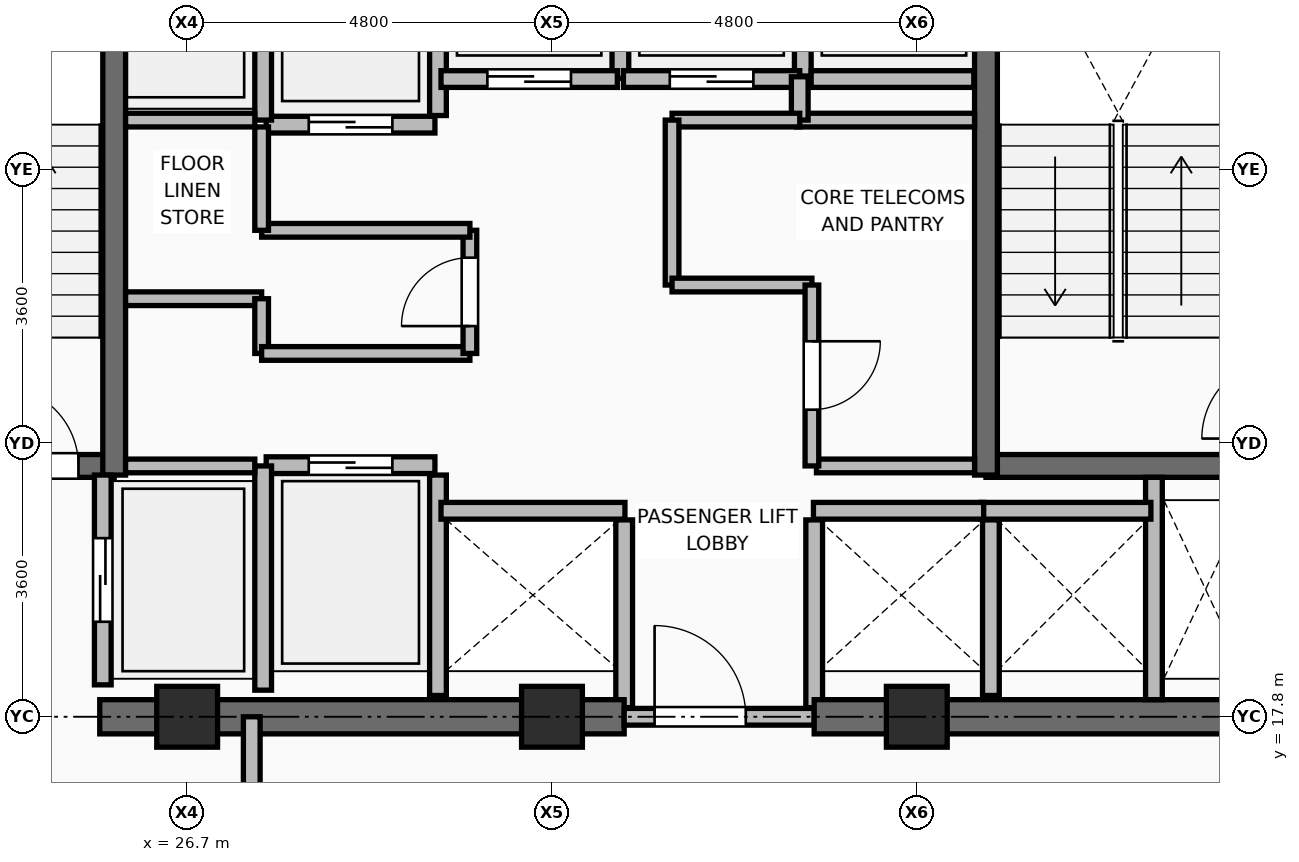
"""IFC4 building model, lengths in metres.
Left out: names, types, materials, properties, quantities, classifications, styles, units other than length and angle.
Written with IfcOpenShell. Run it as: python <this file> out.ifc"""

import sys

from ifc_helpers import new_model, si_unit, direction, frame, frame_2d, origin, origin_2d, place, context, subcontext, project, spatial, rectangle, extrude, element, fill, save


model = new_model("IFC4")
c1 = context("Model", 3, precision=1e-05, world=origin(), true_north=direction((0.0, 1.0)))
c2 = subcontext(c1, "Body", "Model", "MODEL_VIEW")
j1 = project(units=[si_unit("LENGTHUNIT", "METRE"), si_unit("PLANEANGLEUNIT", "RADIAN")], contexts=[c1])
p1 = place(None, origin())
s1 = spatial("IfcSite", under=j1, at=p1, CompositionType="ELEMENT")
p2 = place(p1, origin())
s2 = spatial("IfcBuilding", under=s1, at=p2, CompositionType="ELEMENT")
p3 = place(p2, frame((0.0, 0.0, 246.15)))
s3 = spatial("IfcBuildingStorey", under=s2, at=p3, CompositionType="ELEMENT", Elevation=246.15)
for number, where, z_axis, x_axis in (
    (1, (26.7, 17.8, 0.0), (0.0, 0.0, 1.0), (1.0, 0.0, 0.0)),
    (2, (31.5, 17.8, 0.0), (0.0, 0.0, 1.0), (1.0, 0.0, 0.0)),
    (3, (36.3, 17.8, 0.0), (0.0, 0.0, 1.0), (1.0, 0.0, 0.0)),
):
    element("IfcColumn", number, at=place(p3, frame(where, z_axis=z_axis, x_axis=x_axis)), inside=s3, PredefinedType="COLUMN", context=c2, shape_type="SweptSolid", body=[
        extrude(rectangle(XDim=0.8, YDim=0.8, at=origin_2d()), origin(), (0.0, 0.0, 1.0), 3.75),
    ])
p4 = place(p3, frame((30.0, 18.08, 0.0), z_axis=(0.0, 0.0, 1.0), x_axis=(0.0, 1.0, 0.0)))
e4 = element("IfcWall", 4, at=p4, inside=s3, PredefinedType="PARTITIONING", context=c2, shape_type="SweptSolid", body=[
    extrude(rectangle(XDim=2.9, YDim=0.22, at=frame_2d((1.45, 0.0))), origin(), (0.0, 0.0, 1.0), 3.545),
])
for number, where, z_axis, x_axis in (
    (5, (32.45, 17.92, 0.0), (0.0, 0.0, 1.0), (0.0, 1.0, 0.0)),
    (6, (34.95, 17.92, 0.0), (0.0, 0.0, 1.0), (0.0, 1.0, 0.0)),
):
    element("IfcWall", number, at=place(p3, frame(where, z_axis=z_axis, x_axis=x_axis)), inside=s3, PredefinedType="PARTITIONING", context=c2, shape_type="SweptSolid", body=[
        extrude(rectangle(XDim=2.47, YDim=0.22, at=frame_2d((1.235, 0.0))), origin(), (0.0, 0.0, 1.0), 3.545),
    ])
p5 = place(p3, frame((37.275, 18.08, 0.0), z_axis=(0.0, 0.0, 1.0), x_axis=(0.0, 1.0, 0.0)))
e7 = element("IfcWall", 7, at=p5, inside=s3, PredefinedType="PARTITIONING", context=c2, shape_type="SweptSolid", body=[
    extrude(rectangle(XDim=2.31, YDim=0.22, at=frame_2d((1.155, 0.0))), origin(), (0.0, 0.0, 1.0), 3.545),
])
p6 = place(p3, frame((30.0, 25.71, 0.0), z_axis=(0.0, 0.0, 1.0), x_axis=(0.0, 1.0, 0.0)))
e8 = element("IfcWall", 8, at=p6, inside=s3, PredefinedType="PARTITIONING", context=c2, shape_type="SweptSolid", body=[
    extrude(rectangle(XDim=2.73, YDim=0.22, at=frame_2d((1.365, 0.0))), origin(), (0.0, 0.0, 1.0), 3.545),
])
p7 = place(p3, frame((32.4, 26.2, 0.0), z_axis=(0.0, 0.0, 1.0), x_axis=(0.0, 1.0, 0.0)))
e9 = element("IfcWall", 9, at=p7, inside=s3, PredefinedType="PARTITIONING", context=c2, shape_type="SweptSolid", body=[
    extrude(rectangle(XDim=2.24, YDim=0.22, at=frame_2d((1.12, 0.0))), origin(), (0.0, 0.0, 1.0), 3.545),
])
p8 = place(p3, frame((34.8, 26.23, 0.0), z_axis=(0.0, 0.0, 1.0), x_axis=(0.0, 1.0, 0.0)))
e10 = element("IfcWall", 10, at=p8, inside=s3, PredefinedType="PARTITIONING", context=c2, shape_type="SweptSolid", body=[
    extrude(rectangle(XDim=2.21, YDim=0.22, at=frame_2d((1.105, 0.0))), origin(), (0.0, 0.0, 1.0), 3.545),
])
p9 = place(p3, frame((34.91, 26.19, 0.0), z_axis=(0.0, 0.0, 1.0), x_axis=(1.0, 0.0, 0.0)))
e11 = element("IfcWall", 11, at=p9, inside=s3, PredefinedType="PARTITIONING", context=c2, shape_type="SweptSolid", body=[
    extrude(rectangle(XDim=2.14, YDim=0.22, at=frame_2d((1.07, 0.0))), origin(), (0.0, 0.0, 1.0), 3.545),
])
p10 = place(p3, frame((25.55, 17.8, 0.0), z_axis=(0.0, 0.0, 1.0), x_axis=(1.0, 0.0, 0.0)))
e12 = element("IfcWall", 12, at=p10, inside=s3, PredefinedType="SHEAR", context=c2, shape_type="SweptSolid", body=[
    extrude(rectangle(XDim=6.9, YDim=0.45, at=frame_2d((3.45, 0.0))), origin(), (0.0, 0.0, 1.0), 3.57),
])
p11 = place(p3, frame((32.45, 17.8, 0.0), z_axis=(0.0, 0.0, 1.0), x_axis=(1.0, 0.0, 0.0)))
e13 = element("IfcWall", 13, at=p11, inside=s3, PredefinedType="PARTITIONING", context=c2, shape_type="SweptSolid", body=[
    extrude(rectangle(XDim=2.5, YDim=0.22, at=frame_2d((1.25, 0.0))), origin(), (0.0, 0.0, 1.0), 3.081),
])
p12 = place(p11, frame((0.4, 0.0, 0.0)))
e14 = element("IfcOpeningElement", 14, at=p12, cuts=e13, PredefinedType="OPENING", context=c2, shape_type="SweptSolid", body=[
    extrude(rectangle(XDim=1.2, YDim=2.1, at=frame_2d((0.6, 1.05))), frame((0.0, 0.12, 0.0), z_axis=(0.0, -1.0, 0.0), x_axis=(1.0, 0.0, 0.0)), (0.0, 0.0, 1.0), 0.24),
])
p13 = place(p3, frame((34.95, 17.8, 0.0), z_axis=(0.0, 0.0, 1.0), x_axis=(1.0, 0.0, 0.0)))
e15 = element("IfcWall", 15, at=p13, inside=s3, PredefinedType="SHEAR", context=c2, shape_type="SweptSolid", body=[
    extrude(rectangle(XDim=6.375, YDim=0.45, at=frame_2d((3.188, 0.0))), origin(), (0.0, 0.0, 1.0), 3.57),
])
p14 = place(p3, frame((22.125, 21.1, 0.0), z_axis=(0.0, 0.0, 1.0), x_axis=(1.0, 0.0, 0.0)))
e16 = element("IfcWall", 16, at=p14, inside=s3, PredefinedType="SHEAR", context=c2, shape_type="SweptSolid", body=[
    extrude(rectangle(XDim=3.615, YDim=0.3, at=frame_2d((1.808, 0.0))), origin(), (0.0, 0.0, 1.0), 3.57),
])
p15 = place(p14, frame((2.095, 0.0, 0.0)))
e17 = element("IfcOpeningElement", 17, at=p15, cuts=e16, PredefinedType="OPENING", context=c2, shape_type="SweptSolid", body=[
    extrude(rectangle(XDim=1.05, YDim=2.1, at=frame_2d((0.525, 1.05))), frame((0.0, 0.16, 0.0), z_axis=(0.0, -1.0, 0.0), x_axis=(1.0, 0.0, 0.0)), (0.0, 0.0, 1.0), 0.32),
])
p16 = place(p3, frame((25.74, 20.98, 0.0), z_axis=(0.0, 0.0, 1.0), x_axis=(0.0, 1.0, 0.0)))
e18 = element("IfcWall", 18, at=p16, inside=s3, PredefinedType="SHEAR", context=c2, shape_type="SweptSolid", body=[
    extrude(rectangle(XDim=7.99, YDim=0.3, at=frame_2d((3.995, 0.0))), origin(), (0.0, 0.0, 1.0), 3.57),
])
p17 = place(p3, frame((37.21, 21.1, 0.0), z_axis=(0.0, 0.0, 1.0), x_axis=(1.0, 0.0, 0.0)))
e19 = element("IfcWall", 19, at=p17, inside=s3, PredefinedType="SHEAR", context=c2, shape_type="SweptSolid", body=[
    extrude(rectangle(XDim=3.665, YDim=0.3, at=frame_2d((1.833, 0.0))), origin(), (0.0, 0.0, 1.0), 3.57),
])
p18 = place(p3, frame((37.21, 20.98, 0.0), z_axis=(0.0, 0.0, 1.0), x_axis=(0.0, 1.0, 0.0)))
e20 = element("IfcWall", 20, at=p18, inside=s3, PredefinedType="SHEAR", context=c2, shape_type="SweptSolid", body=[
    extrude(rectangle(XDim=7.99, YDim=0.3, at=frame_2d((3.995, 0.0))), origin(), (0.0, 0.0, 1.0), 3.57),
])
p19 = place(p3, frame((39.42, 18.025, 0.0), z_axis=(0.0, 0.0, 1.0), x_axis=(0.0, 1.0, 0.0)))
e21 = element("IfcWall", 21, at=p19, inside=s3, PredefinedType="PARTITIONING", context=c2, shape_type="SweptSolid", body=[
    extrude(rectangle(XDim=2.925, YDim=0.22, at=frame_2d((1.462, 0.0))), origin(), (0.0, 0.0, 1.0), 3.55),
])
p20 = place(p3, frame((25.59, 18.22, 0.0), z_axis=(0.0, 0.0, 1.0), x_axis=(0.0, 1.0, 0.0)))
e22 = element("IfcWall", 22, at=p20, inside=s3, PredefinedType="PARTITIONING", context=c2, shape_type="SweptSolid", body=[
    extrude(rectangle(XDim=2.76, YDim=0.22, at=frame_2d((1.38, 0.0))), origin(), (0.0, 0.0, 1.0), 3.55),
])
p21 = place(p20, frame((0.83, 0.0, 0.0)))
e23 = element("IfcOpeningElement", 23, at=p21, cuts=e22, PredefinedType="OPENING", context=c2, shape_type="SweptSolid", body=[
    extrude(rectangle(XDim=1.1, YDim=2.2, at=frame_2d((0.55, 1.1))), frame((0.0, 0.12, 0.0), z_axis=(0.0, -1.0, 0.0), x_axis=(1.0, 0.0, 0.0)), (0.0, 0.0, 1.0), 0.24),
])
p22 = place(p3, frame((27.74, 21.11, 0.0), z_axis=(0.0, 0.0, 1.0), x_axis=(1.0, 0.0, 0.0)))
e24 = element("IfcWall", 24, at=p22, inside=s3, PredefinedType="PARTITIONING", context=c2, shape_type="SweptSolid", body=[
    extrude(rectangle(XDim=2.22, YDim=0.22, at=frame_2d((1.11, 0.0))), origin(), (0.0, 0.0, 1.0), 3.55),
])
p23 = place(p22, frame((0.56, 0.0, 0.0)))
e25 = element("IfcOpeningElement", 25, at=p23, cuts=e24, PredefinedType="OPENING", context=c2, shape_type="SweptSolid", body=[
    extrude(rectangle(XDim=1.1, YDim=2.2, at=frame_2d((0.55, 1.1))), frame((0.0, 0.12, 0.0), z_axis=(0.0, -1.0, 0.0), x_axis=(1.0, 0.0, 0.0)), (0.0, 0.0, 1.0), 0.24),
])
p24 = place(p3, frame((27.74, 25.59, 0.0), z_axis=(0.0, 0.0, 1.0), x_axis=(1.0, 0.0, 0.0)))
e26 = element("IfcWall", 26, at=p24, inside=s3, PredefinedType="PARTITIONING", context=c2, shape_type="SweptSolid", body=[
    extrude(rectangle(XDim=2.22, YDim=0.22, at=frame_2d((1.11, 0.0))), origin(), (0.0, 0.0, 1.0), 3.55),
])
p25 = place(p24, frame((0.56, 0.0, 0.0)))
e27 = element("IfcOpeningElement", 27, at=p25, cuts=e26, PredefinedType="OPENING", context=c2, shape_type="SweptSolid", body=[
    extrude(rectangle(XDim=1.1, YDim=2.2, at=frame_2d((0.55, 1.1))), frame((0.0, 0.12, 0.0), z_axis=(0.0, -1.0, 0.0), x_axis=(1.0, 0.0, 0.0)), (0.0, 0.0, 1.0), 0.24),
])
p26 = place(p3, frame((30.04, 20.51, 0.0), z_axis=(0.0, 0.0, 1.0), x_axis=(1.0, 0.0, 0.0)))
e28 = element("IfcWall", 28, at=p26, inside=s3, PredefinedType="PARTITIONING", context=c2, shape_type="SweptSolid", body=[
    extrude(rectangle(XDim=2.42, YDim=0.22, at=frame_2d((1.21, 0.0))), origin(), (0.0, 0.0, 1.0), 3.55),
])
for number, where, z_axis, x_axis in (
    (29, (37.14, 20.51, 0.0), (0.0, 0.0, 1.0), (1.0, 0.0, 0.0)),
    (30, (34.94, 20.51, 0.0), (0.0, 0.0, 1.0), (1.0, 0.0, 0.0)),
):
    element("IfcWall", number, at=place(p3, frame(where, z_axis=z_axis, x_axis=x_axis)), inside=s3, PredefinedType="PARTITIONING", context=c2, shape_type="SweptSolid", body=[
        extrude(rectangle(XDim=2.24, YDim=0.22, at=frame_2d((1.12, 0.0))), origin(), (0.0, 0.0, 1.0), 3.55),
    ])
p27 = place(p3, frame((30.04, 26.19, 0.0), z_axis=(0.0, 0.0, 1.0), x_axis=(1.0, 0.0, 0.0)))
e31 = element("IfcWall", 31, at=p27, inside=s3, PredefinedType="PARTITIONING", context=c2, shape_type="SweptSolid", body=[
    extrude(rectangle(XDim=2.32, YDim=0.22, at=frame_2d((1.16, 0.0))), origin(), (0.0, 0.0, 1.0), 3.55),
])
p28 = place(p27, frame((0.61, 0.0, 0.0)))
e32 = element("IfcOpeningElement", 32, at=p28, cuts=e31, PredefinedType="OPENING", context=c2, shape_type="SweptSolid", body=[
    extrude(rectangle(XDim=1.1, YDim=2.2, at=frame_2d((0.55, 1.1))), frame((0.0, 0.12, 0.0), z_axis=(0.0, -1.0, 0.0), x_axis=(1.0, 0.0, 0.0)), (0.0, 0.0, 1.0), 0.24),
])
p29 = place(p3, frame((32.44, 26.19, 0.0), z_axis=(0.0, 0.0, 1.0), x_axis=(1.0, 0.0, 0.0)))
e33 = element("IfcWall", 33, at=p29, inside=s3, PredefinedType="PARTITIONING", context=c2, shape_type="SweptSolid", body=[
    extrude(rectangle(XDim=2.32, YDim=0.22, at=frame_2d((1.16, 0.0))), origin(), (0.0, 0.0, 1.0), 3.55),
])
p30 = place(p29, frame((0.61, 0.0, 0.0)))
e34 = element("IfcOpeningElement", 34, at=p30, cuts=e33, PredefinedType="OPENING", context=c2, shape_type="SweptSolid", body=[
    extrude(rectangle(XDim=1.1, YDim=2.2, at=frame_2d((0.55, 1.1))), frame((0.0, 0.12, 0.0), z_axis=(0.0, -1.0, 0.0), x_axis=(1.0, 0.0, 0.0)), (0.0, 0.0, 1.0), 0.24),
])
p31 = place(p3, frame((27.7, 18.15, 0.0), z_axis=(0.0, 0.0, 1.0), x_axis=(0.0, 1.0, 0.0)))
e35 = element("IfcWall", 35, at=p31, inside=s3, PredefinedType="PARTITIONING", context=c2, shape_type="SweptSolid", body=[
    extrude(rectangle(XDim=2.95, YDim=0.22, at=frame_2d((1.475, 0.0))), origin(), (0.0, 0.0, 1.0), 3.55),
])
p32 = place(p3, frame((27.7, 25.65, 0.0), z_axis=(0.0, 0.0, 1.0), x_axis=(0.0, 1.0, 0.0)))
e36 = element("IfcWall", 36, at=p32, inside=s3, PredefinedType="PARTITIONING", context=c2, shape_type="SweptSolid", body=[
    extrude(rectangle(XDim=3.0, YDim=0.22, at=frame_2d((1.5, 0.0))), origin(), (0.0, 0.0, 1.0), 3.55),
])
for number, where, z_axis, x_axis in (
    (37, (25.89, 21.1, 0.0), (0.0, 0.0, 1.0), (1.0, 0.0, 0.0)),
    (38, (25.89, 25.65, 0.0), (0.0, 0.0, 1.0), (1.0, 0.0, 0.0)),
):
    element("IfcWall", number, at=place(p3, frame(where, z_axis=z_axis, x_axis=x_axis)), inside=s3, PredefinedType="PARTITIONING", context=c2, shape_type="SweptSolid", body=[
        extrude(rectangle(XDim=1.7, YDim=0.18, at=frame_2d((0.85, 0.0))), origin(), (0.0, 0.0, 1.0), 3.55),
    ])
p33 = place(p3, frame((25.89, 23.3, 0.0), z_axis=(0.0, 0.0, 1.0), x_axis=(1.0, 0.0, 0.0)))
e39 = element("IfcWall", 39, at=p33, inside=s3, PredefinedType="PARTITIONING", context=c2, shape_type="SweptSolid", body=[
    extrude(rectangle(XDim=1.79, YDim=0.18, at=frame_2d((0.895, 0.0))), origin(), (0.0, 0.0, 1.0), 3.55),
])
p34 = place(p3, frame((27.68, 22.58, 0.0), z_axis=(0.0, 0.0, 1.0), x_axis=(0.0, 1.0, 0.0)))
e40 = element("IfcWall", 40, at=p34, inside=s3, PredefinedType="PARTITIONING", context=c2, shape_type="SweptSolid", body=[
    extrude(rectangle(XDim=0.72, YDim=0.18, at=frame_2d((0.36, 0.0))), origin(), (0.0, 0.0, 1.0), 3.55),
])
p35 = place(p3, frame((27.68, 22.58, 0.0), z_axis=(0.0, 0.0, 1.0), x_axis=(1.0, 0.0, 0.0)))
e41 = element("IfcWall", 41, at=p35, inside=s3, PredefinedType="PARTITIONING", context=c2, shape_type="SweptSolid", body=[
    extrude(rectangle(XDim=2.74, YDim=0.18, at=frame_2d((1.37, 0.0))), origin(), (0.0, 0.0, 1.0), 3.55),
])
p36 = place(p3, frame((30.42, 22.58, 0.0), z_axis=(0.0, 0.0, 1.0), x_axis=(0.0, 1.0, 0.0)))
e42 = element("IfcWall", 42, at=p36, inside=s3, PredefinedType="PARTITIONING", context=c2, shape_type="SweptSolid", body=[
    extrude(rectangle(XDim=1.62, YDim=0.18, at=frame_2d((0.81, 0.0))), origin(), (0.0, 0.0, 1.0), 3.55),
])
p37 = place(p36, frame((0.36, 0.0, 0.0)))
e43 = element("IfcOpeningElement", 43, at=p37, cuts=e42, PredefinedType="OPENING", context=c2, shape_type="SweptSolid", body=[
    extrude(rectangle(XDim=0.9, YDim=2.1, at=frame_2d((0.45, 1.05))), frame((0.0, 0.1, 0.0), z_axis=(0.0, -1.0, 0.0), x_axis=(1.0, 0.0, 0.0)), (0.0, 0.0, 1.0), 0.2),
])
p38 = place(p3, frame((27.68, 24.2, 0.0), z_axis=(0.0, 0.0, 1.0), x_axis=(1.0, 0.0, 0.0)))
e44 = element("IfcWall", 44, at=p38, inside=s3, PredefinedType="PARTITIONING", context=c2, shape_type="SweptSolid", body=[
    extrude(rectangle(XDim=2.74, YDim=0.18, at=frame_2d((1.37, 0.0))), origin(), (0.0, 0.0, 1.0), 3.55),
])
p39 = place(p3, frame((27.68, 24.2, 0.0), z_axis=(0.0, 0.0, 1.0), x_axis=(0.0, 1.0, 0.0)))
e45 = element("IfcWall", 45, at=p39, inside=s3, PredefinedType="PARTITIONING", context=c2, shape_type="SweptSolid", body=[
    extrude(rectangle(XDim=1.36, YDim=0.18, at=frame_2d((0.68, 0.0))), origin(), (0.0, 0.0, 1.0), 3.55),
])
p40 = place(p3, frame((34.98, 21.1, 0.0), z_axis=(0.0, 0.0, 1.0), x_axis=(1.0, 0.0, 0.0)))
e46 = element("IfcWall", 46, at=p40, inside=s3, PredefinedType="PARTITIONING", context=c2, shape_type="SweptSolid", body=[
    extrude(rectangle(XDim=2.08, YDim=0.18, at=frame_2d((1.04, 0.0))), origin(), (0.0, 0.0, 1.0), 3.55),
])
p41 = place(p3, frame((34.72, 25.65, 0.0), z_axis=(0.0, 0.0, 1.0), x_axis=(1.0, 0.0, 0.0)))
e47 = element("IfcWall", 47, at=p41, inside=s3, PredefinedType="PARTITIONING", context=c2, shape_type="SweptSolid", body=[
    extrude(rectangle(XDim=2.34, YDim=0.18, at=frame_2d((1.17, 0.0))), origin(), (0.0, 0.0, 1.0), 3.55),
])
p42 = place(p3, frame((34.76, 25.65, 0.0), z_axis=(0.0, 0.0, 1.0), x_axis=(0.0, 1.0, 0.0)))
e48 = element("IfcWall", 48, at=p42, inside=s3, PredefinedType="PARTITIONING", context=c2, shape_type="SweptSolid", body=[
    extrude(rectangle(XDim=0.57, YDim=0.22, at=frame_2d((0.285, 0.0))), origin(), (0.0, 0.0, 1.0), 3.55),
])
p43 = place(p3, frame((33.08, 25.65, 0.0), z_axis=(0.0, 0.0, 1.0), x_axis=(1.0, 0.0, 0.0)))
e49 = element("IfcWall", 49, at=p43, inside=s3, PredefinedType="PARTITIONING", context=c2, shape_type="SweptSolid", body=[
    extrude(rectangle(XDim=1.68, YDim=0.18, at=frame_2d((0.84, 0.0))), origin(), (0.0, 0.0, 1.0), 3.55),
])
p44 = place(p3, frame((33.08, 23.48, 0.0), z_axis=(0.0, 0.0, 1.0), x_axis=(0.0, 1.0, 0.0)))
e50 = element("IfcWall", 50, at=p44, inside=s3, PredefinedType="PARTITIONING", context=c2, shape_type="SweptSolid", body=[
    extrude(rectangle(XDim=2.17, YDim=0.18, at=frame_2d((1.085, 0.0))), origin(), (0.0, 0.0, 1.0), 3.55),
])
p45 = place(p3, frame((33.08, 23.48, 0.0), z_axis=(0.0, 0.0, 1.0), x_axis=(1.0, 0.0, 0.0)))
e51 = element("IfcWall", 51, at=p45, inside=s3, PredefinedType="PARTITIONING", context=c2, shape_type="SweptSolid", body=[
    extrude(rectangle(XDim=1.84, YDim=0.18, at=frame_2d((0.92, 0.0))), origin(), (0.0, 0.0, 1.0), 3.55),
])
p46 = place(p3, frame((34.92, 21.1, 0.0), z_axis=(0.0, 0.0, 1.0), x_axis=(0.0, 1.0, 0.0)))
e52 = element("IfcWall", 52, at=p46, inside=s3, PredefinedType="PARTITIONING", context=c2, shape_type="SweptSolid", body=[
    extrude(rectangle(XDim=2.38, YDim=0.18, at=frame_2d((1.19, 0.0))), origin(), (0.0, 0.0, 1.0), 3.55),
])
p47 = place(p46, frame((0.74, 0.0, 0.0)))
e53 = element("IfcOpeningElement", 53, at=p47, cuts=e52, PredefinedType="OPENING", context=c2, shape_type="SweptSolid", body=[
    extrude(rectangle(XDim=0.9, YDim=2.1, at=frame_2d((0.45, 1.05))), frame((0.0, 0.1, 0.0), z_axis=(0.0, -1.0, 0.0), x_axis=(1.0, 0.0, 0.0)), (0.0, 0.0, 1.0), 0.2),
])
p48 = place(p3, frame((27.55, 14.35, 0.0), z_axis=(0.0, 0.0, 1.0), x_axis=(0.0, 1.0, 0.0)))
e54 = element("IfcWall", 54, at=p48, inside=s3, PredefinedType="PARTITIONING", context=c2, shape_type="SweptSolid", body=[
    extrude(rectangle(XDim=3.45, YDim=0.22, at=frame_2d((1.725, 0.0))), origin(), (0.0, 0.0, 1.0), 3.081),
])
p49 = place(p48, frame((1.175, 0.0, 0.0)))
e55 = element("IfcOpeningElement", 55, at=p49, cuts=e54, PredefinedType="OPENING", context=c2, shape_type="SweptSolid", body=[
    extrude(rectangle(XDim=1.1, YDim=2.1, at=frame_2d((0.55, 1.05))), frame((0.0, 0.12, 0.0), z_axis=(0.0, -1.0, 0.0), x_axis=(1.0, 0.0, 0.0)), (0.0, 0.0, 1.0), 0.24),
])
p50 = place(p12, origin())
e56 = element("IfcDoor", 56, at=p50, inside=s3, OperationType="SINGLE_SWING_LEFT", PredefinedType="DOOR", context=c2, shape_type="SweptSolid", body=[
    extrude(rectangle(XDim=1.2, YDim=2.1, at=frame_2d((0.6, 1.05))), frame((0.0, 0.025, 0.0), z_axis=(0.0, -1.0, 0.0), x_axis=(1.0, 0.0, 0.0)), (0.0, 0.0, 1.0), 0.05),
])
fill(e14, e56)
p51 = place(p15, origin())
e57 = element("IfcDoor", 57, at=p51, inside=s3, OperationType="SINGLE_SWING_LEFT", PredefinedType="DOOR", context=c2, shape_type="SweptSolid", body=[
    extrude(rectangle(XDim=1.05, YDim=2.1, at=frame_2d((0.525, 1.05))), frame((0.0, 0.025, 0.0), z_axis=(0.0, -1.0, 0.0), x_axis=(1.0, 0.0, 0.0)), (0.0, 0.0, 1.0), 0.05),
])
fill(e17, e57)
p52 = place(p21, origin())
e58 = element("IfcDoor", 58, at=p52, inside=s3, OperationType="DOUBLE_DOOR_SLIDING", PredefinedType="DOOR", context=c2, shape_type="SweptSolid", body=[
    extrude(rectangle(XDim=1.1, YDim=2.2, at=frame_2d((0.55, 1.1))), frame((0.0, 0.025, 0.0), z_axis=(0.0, -1.0, 0.0), x_axis=(1.0, 0.0, 0.0)), (0.0, 0.0, 1.0), 0.05),
])
fill(e23, e58)
p53 = place(p23, origin())
e59 = element("IfcDoor", 59, at=p53, inside=s3, OperationType="DOUBLE_DOOR_SLIDING", PredefinedType="DOOR", context=c2, shape_type="SweptSolid", body=[
    extrude(rectangle(XDim=1.1, YDim=2.2, at=frame_2d((0.55, 1.1))), frame((0.0, 0.025, 0.0), z_axis=(0.0, -1.0, 0.0), x_axis=(1.0, 0.0, 0.0)), (0.0, 0.0, 1.0), 0.05),
])
fill(e25, e59)
p54 = place(p25, frame((1.1, 0.0, 0.0), z_axis=(0.0, 0.0, 1.0), x_axis=(-1.0, 0.0, 0.0)))
e60 = element("IfcDoor", 60, at=p54, inside=s3, OperationType="DOUBLE_DOOR_SLIDING", PredefinedType="DOOR", context=c2, shape_type="SweptSolid", body=[
    extrude(rectangle(XDim=1.1, YDim=2.2, at=frame_2d((0.55, 1.1))), frame((0.0, 0.025, 0.0), z_axis=(0.0, -1.0, 0.0), x_axis=(1.0, 0.0, 0.0)), (0.0, 0.0, 1.0), 0.05),
])
fill(e27, e60)
p55 = place(p28, frame((1.1, 0.0, 0.0), z_axis=(0.0, 0.0, 1.0), x_axis=(-1.0, 0.0, 0.0)))
e61 = element("IfcDoor", 61, at=p55, inside=s3, OperationType="DOUBLE_DOOR_SLIDING", PredefinedType="DOOR", context=c2, shape_type="SweptSolid", body=[
    extrude(rectangle(XDim=1.1, YDim=2.2, at=frame_2d((0.55, 1.1))), frame((0.0, 0.025, 0.0), z_axis=(0.0, -1.0, 0.0), x_axis=(1.0, 0.0, 0.0)), (0.0, 0.0, 1.0), 0.05),
])
fill(e32, e61)
p56 = place(p30, frame((1.1, 0.0, 0.0), z_axis=(0.0, 0.0, 1.0), x_axis=(-1.0, 0.0, 0.0)))
e62 = element("IfcDoor", 62, at=p56, inside=s3, OperationType="DOUBLE_DOOR_SLIDING", PredefinedType="DOOR", context=c2, shape_type="SweptSolid", body=[
    extrude(rectangle(XDim=1.1, YDim=2.2, at=frame_2d((0.55, 1.1))), frame((0.0, 0.025, 0.0), z_axis=(0.0, -1.0, 0.0), x_axis=(1.0, 0.0, 0.0)), (0.0, 0.0, 1.0), 0.05),
])
fill(e34, e62)
p57 = place(p37, origin())
e63 = element("IfcDoor", 63, at=p57, inside=s3, OperationType="SINGLE_SWING_LEFT", PredefinedType="DOOR", context=c2, shape_type="SweptSolid", body=[
    extrude(rectangle(XDim=0.9, YDim=2.1, at=frame_2d((0.45, 1.05))), frame((0.0, 0.025, 0.0), z_axis=(0.0, -1.0, 0.0), x_axis=(1.0, 0.0, 0.0)), (0.0, 0.0, 1.0), 0.05),
])
fill(e43, e63)
p58 = place(p47, frame((0.9, 0.0, 0.0), z_axis=(0.0, 0.0, 1.0), x_axis=(-1.0, 0.0, 0.0)))
e64 = element("IfcDoor", 64, at=p58, inside=s3, OperationType="SINGLE_SWING_LEFT", PredefinedType="DOOR", context=c2, shape_type="SweptSolid", body=[
    extrude(rectangle(XDim=0.9, YDim=2.1, at=frame_2d((0.45, 1.05))), frame((0.0, 0.025, 0.0), z_axis=(0.0, -1.0, 0.0), x_axis=(1.0, 0.0, 0.0)), (0.0, 0.0, 1.0), 0.05),
])
fill(e53, e64)
save(model, sys.argv[1])
